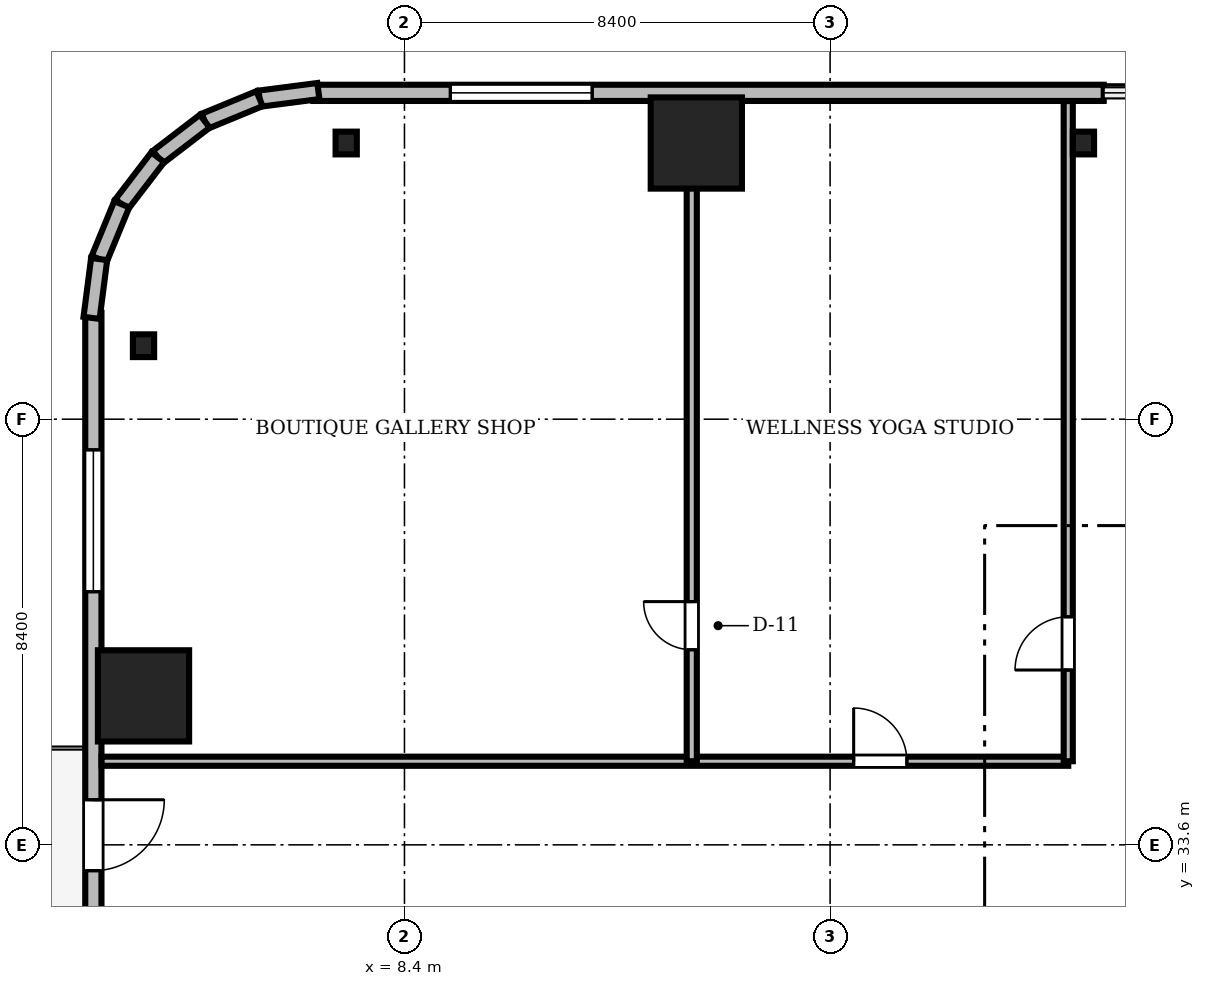
"""IFC4 building model, lengths in metres.
Left out: names, types, materials, properties, quantities, classifications, styles, units other than length and angle.
Written with IfcOpenShell. Run it as: python <this file> out.ifc"""

import sys

from ifc_helpers import new_model, si_unit, direction, frame, frame_2d, origin, origin_2d, place, context, subcontext, project, spatial, rectangle, i_section, extrude, source, transform, mapped, element, fill, save


model = new_model("IFC4")
c1 = context("Model", 3, precision=1e-05, world=origin(), true_north=direction((0.0, 1.0)))
c2 = subcontext(c1, "Body", "Model", "MODEL_VIEW")
j1 = project(units=[si_unit("LENGTHUNIT", "METRE"), si_unit("PLANEANGLEUNIT", "RADIAN")], contexts=[c1])
p1 = place(None, origin())
s1 = spatial("IfcSite", under=j1, at=p1, CompositionType="ELEMENT")
p2 = place(p1, origin())
s2 = spatial("IfcBuilding", under=s1, at=p2, CompositionType="ELEMENT")
p3 = place(p2, frame((0.0, 0.0, 49.5)))
s3 = spatial("IfcBuildingStorey", under=s2, at=p3, CompositionType="ELEMENT", Elevation=49.5)
m1 = source(origin(), c2, "Body", "SweptSolid", [
    extrude(rectangle(XDim=1.8, YDim=1.8, at=origin_2d()), origin(), (0.0, 0.0, 1.0), 3.41),
])
for number, where, z_axis, x_axis in (
    (1, (14.16, 47.45, 0.0), (0.0, 0.0, 1.0), (1.0, 0.0, 0.0)),
    (2, (3.25, 36.54, 0.0), (0.0, 0.0, 1.0), (1.0, 0.0, 0.0)),
):
    element("IfcColumn", number, at=place(p3, frame(where, z_axis=z_axis, x_axis=x_axis)), inside=s3, PredefinedType="COLUMN", context=c2, shape_type="MappedRepresentation", body=[
        mapped(m1, transform((0.0, 0.0, 0.0), scale=1.0)),
    ])
m2 = source(origin(), c2, "Body", "SweptSolid", [
    extrude(i_section(OverallWidth=0.419, OverallDepth=0.449, WebThickness=0.031, FlangeThickness=0.048, FilletRadius=0.015, at=origin_2d()), origin(), (0.0, 0.0, 1.0), 3.41),
])
for number, where, z_axis, x_axis in (
    (3, (21.8, 47.45, 0.0), (0.0, 0.0, 1.0), (1.0, 0.0, 0.0)),
    (4, (7.25, 47.45, 0.0), (0.0, 0.0, 1.0), (1.0, 0.0, 0.0)),
    (5, (3.25, 43.45, 0.0), (0.0, 0.0, 1.0), (1.0, 0.0, 0.0)),
):
    element("IfcColumn", number, at=place(p3, frame(where, z_axis=z_axis, x_axis=x_axis)), inside=s3, PredefinedType="COLUMN", context=c2, shape_type="MappedRepresentation", body=[
        mapped(m2, transform((0.0, 0.0, 0.0), scale=1.0)),
    ])
m3 = source(origin(), c2, "Body", "SweptSolid", [
    extrude(rectangle(XDim=15.6, YDim=0.32, at=frame_2d((7.8, 0.0))), origin(), (0.0, 0.0, 1.0), 3.41),
])
p4 = place(p3, frame((22.2, 48.44, 0.0), z_axis=(0.0, 0.0, 1.0), x_axis=(-1.0, 0.0, 0.0)))
e6 = element("IfcWall", 6, at=p4, inside=s3, PredefinedType="SOLIDWALL", context=c2, shape_type="MappedRepresentation", body=[
    mapped(m3, transform((0.0, 0.0, 0.0), scale=1.0)),
])
m4 = source(origin(), c2, "Body", "SweptSolid", [
    extrude(rectangle(XDim=2.8, YDim=2.4, at=frame_2d((1.4, 1.2))), frame((0.0, 0.17, 0.0), z_axis=(0.0, -1.0, 0.0), x_axis=(1.0, 0.0, 0.0)), (0.0, 0.0, 1.0), 0.34),
])
p5 = place(p4, frame((10.095, 0.0, 0.72)))
e7 = element("IfcOpeningElement", 7, at=p5, cuts=e6, PredefinedType="OPENING", context=c2, shape_type="MappedRepresentation", body=[
    mapped(m4, transform((0.0, 0.0, 0.0), scale=1.0)),
])
m5 = source(origin(), c2, "Body", "SweptSolid", [
    extrude(rectangle(XDim=15.6, YDim=0.32, at=frame_2d((7.8, 0.0))), origin(), (0.0, 0.0, 1.0), 3.41),
])
p6 = place(p3, frame((2.26, 44.1, 0.0), z_axis=(0.0, 0.0, 1.0), x_axis=(0.0, -1.0, 0.0)))
e8 = element("IfcWall", 8, at=p6, inside=s3, PredefinedType="SOLIDWALL", context=c2, shape_type="MappedRepresentation", body=[
    mapped(m5, transform((0.0, 0.0, 0.0), scale=1.0)),
])
m6 = source(origin(), c2, "Body", "SweptSolid", [
    extrude(rectangle(XDim=1.4, YDim=2.3, at=frame_2d((0.7, 1.15))), frame((0.0, 0.17, 0.0), z_axis=(0.0, -1.0, 0.0), x_axis=(1.0, 0.0, 0.0)), (0.0, 0.0, 1.0), 0.34),
])
p7 = place(p6, frame((9.61, 0.0, 0.0)))
e9 = element("IfcOpeningElement", 9, at=p7, cuts=e8, PredefinedType="OPENING", context=c2, shape_type="MappedRepresentation", body=[
    mapped(m6, transform((0.0, 0.0, 0.0), scale=1.0)),
])
p8 = place(p6, frame((2.705, 0.0, 0.72)))
e10 = element("IfcOpeningElement", 10, at=p8, cuts=e8, PredefinedType="OPENING", context=c2, shape_type="MappedRepresentation", body=[
    mapped(m4, transform((0.0, 0.0, 0.0), scale=1.0)),
])
m7 = source(origin(), c2, "Body", "SweptSolid", [
    extrude(rectangle(XDim=1.17, YDim=0.32, at=frame_2d((0.585, 0.0))), origin(), (0.0, 0.0, 1.0), 3.41),
])
p9 = place(p3, frame((6.7, 48.476, 0.0), z_axis=(0.0, 0.0, 1.0), x_axis=(-0.991735963317, -0.128295670475, 0.0)))
e11 = element("IfcWall", 11, at=p9, inside=s3, PredefinedType="SOLIDWALL", context=c2, shape_type="MappedRepresentation", body=[
    mapped(m7, transform((0.0, 0.0, 0.0), scale=1.0)),
])
m8 = source(origin(), c2, "Body", "SweptSolid", [
    extrude(rectangle(XDim=1.169, YDim=0.32, at=frame_2d((0.584, 0.0))), origin(), (0.0, 0.0, 1.0), 3.41),
])
p10 = place(p3, frame((5.54, 48.325, 0.0), z_axis=(0.0, 0.0, 1.0), x_axis=(-0.924552646638, -0.381054331552, 0.0)))
e12 = element("IfcWall", 12, at=p10, inside=s3, PredefinedType="SOLIDWALL", context=c2, shape_type="MappedRepresentation", body=[
    mapped(m8, transform((0.0, 0.0, 0.0), scale=1.0)),
])
m9 = source(origin(), c2, "Body", "SweptSolid", [
    extrude(rectangle(XDim=1.169, YDim=0.32, at=frame_2d((0.584, 0.0))), origin(), (0.0, 0.0, 1.0), 3.41),
])
p11 = place(p3, frame((4.459, 47.88, 0.0), z_axis=(0.0, 0.0, 1.0), x_axis=(-0.793663520347, -0.608356981114, 0.0)))
e13 = element("IfcWall", 13, at=p11, inside=s3, PredefinedType="SOLIDWALL", context=c2, shape_type="MappedRepresentation", body=[
    mapped(m9, transform((0.0, 0.0, 0.0), scale=1.0)),
])
m10 = source(origin(), c2, "Body", "SweptSolid", [
    extrude(rectangle(XDim=1.169, YDim=0.32, at=frame_2d((0.584, 0.0))), origin(), (0.0, 0.0, 1.0), 3.41),
])
p12 = place(p3, frame((3.531, 47.169, 0.0), z_axis=(0.0, 0.0, 1.0), x_axis=(-0.608387696831, -0.793639975269, 0.0)))
e14 = element("IfcWall", 14, at=p12, inside=s3, PredefinedType="SOLIDWALL", context=c2, shape_type="MappedRepresentation", body=[
    mapped(m10, transform((0.0, 0.0, 0.0), scale=1.0)),
])
p13 = place(p3, frame((2.82, 46.241, 0.0), z_axis=(0.0, 0.0, 1.0), x_axis=(-0.381054331552, -0.924552646638, 0.0)))
e15 = element("IfcWall", 15, at=p13, inside=s3, PredefinedType="SOLIDWALL", context=c2, shape_type="MappedRepresentation", body=[
    mapped(m8, transform((0.0, 0.0, 0.0), scale=1.0)),
])
p14 = place(p3, frame((2.375, 45.16, 0.0), z_axis=(0.0, 0.0, 1.0), x_axis=(-0.128295670475, -0.991735963317, 0.0)))
e16 = element("IfcWall", 16, at=p14, inside=s3, PredefinedType="SOLIDWALL", context=c2, shape_type="MappedRepresentation", body=[
    mapped(m7, transform((0.0, 0.0, 0.0), scale=1.0)),
])
m11 = source(origin(), c2, "Body", "SweptSolid", [
    extrude(rectangle(XDim=19.078, YDim=0.18, at=frame_2d((9.539, 0.0))), origin(), (0.0, 0.0, 1.0), 2.652),
])
p15 = place(p3, frame((2.422, 35.25, 0.0), z_axis=(0.0, 0.0, 1.0), x_axis=(1.0, 0.0, 0.0)))
e17 = element("IfcWall", 17, at=p15, inside=s3, PredefinedType="PARTITIONING", context=c2, shape_type="MappedRepresentation", body=[
    mapped(m11, transform((0.0, 0.0, 0.0), scale=1.0)),
])
m12 = source(origin(), c2, "Body", "SweptSolid", [
    extrude(rectangle(XDim=1.05, YDim=2.2, at=frame_2d((0.525, 1.1))), frame((0.0, 0.1, 0.0), z_axis=(0.0, -1.0, 0.0), x_axis=(1.0, 0.0, 0.0)), (0.0, 0.0, 1.0), 0.2),
])
p16 = place(p15, frame((14.843, 0.0, 0.0)))
e18 = element("IfcOpeningElement", 18, at=p16, cuts=e17, PredefinedType="OPENING", context=c2, shape_type="MappedRepresentation", body=[
    mapped(m12, transform((0.0, 0.0, 0.0), scale=1.0)),
])
m13 = source(origin(), c2, "Body", "SweptSolid", [
    extrude(rectangle(XDim=13.028, YDim=0.2, at=frame_2d((6.514, 0.0))), origin(), (0.0, 0.0, 1.0), 2.652),
])
p17 = place(p3, frame((14.07, 35.25, 0.0), z_axis=(0.0, 0.0, 1.0), x_axis=(0.0, 1.0, 0.0)))
e19 = element("IfcWall", 19, at=p17, inside=s3, PredefinedType="PARTITIONING", context=c2, shape_type="MappedRepresentation", body=[
    mapped(m13, transform((0.0, 0.0, 0.0), scale=1.0)),
])
m14 = source(origin(), c2, "Body", "SweptSolid", [
    extrude(rectangle(XDim=0.95, YDim=2.15, at=frame_2d((0.475, 1.075))), frame((0.0, 0.11, 0.0), z_axis=(0.0, -1.0, 0.0), x_axis=(1.0, 0.0, 0.0)), (0.0, 0.0, 1.0), 0.22),
])
p18 = place(p17, frame((2.2, 0.0, 0.0)))
e20 = element("IfcOpeningElement", 20, at=p18, cuts=e19, PredefinedType="OPENING", context=c2, shape_type="MappedRepresentation", body=[
    mapped(m14, transform((0.0, 0.0, 0.0), scale=1.0)),
])
m15 = source(origin(), c2, "Body", "SweptSolid", [
    extrude(rectangle(XDim=13.028, YDim=0.18, at=frame_2d((6.514, 0.0))), origin(), (0.0, 0.0, 1.0), 2.652),
])
p19 = place(p3, frame((21.5, 35.25, 0.0), z_axis=(0.0, 0.0, 1.0), x_axis=(0.0, 1.0, 0.0)))
e21 = element("IfcWall", 21, at=p19, inside=s3, PredefinedType="PARTITIONING", context=c2, shape_type="MappedRepresentation", body=[
    mapped(m15, transform((0.0, 0.0, 0.0), scale=1.0)),
])
p20 = place(p19, frame((1.8, 0.0, 0.0)))
e22 = element("IfcOpeningElement", 22, at=p20, cuts=e21, PredefinedType="OPENING", context=c2, shape_type="MappedRepresentation", body=[
    mapped(m12, transform((0.0, 0.0, 0.0), scale=1.0)),
])
m16 = source(origin(), c2, "Body", "SweptSolid", [
    extrude(rectangle(XDim=2.8, YDim=2.4, at=frame_2d((1.4, 1.2))), frame((0.0, 0.03, 0.0), z_axis=(0.0, -1.0, 0.0), x_axis=(1.0, 0.0, 0.0)), (0.0, 0.0, 1.0), 0.06),
])
p21 = place(p5, origin())
e23 = element("IfcWindow", 23, at=p21, inside=s3, PartitioningType="SINGLE_PANEL", PredefinedType="WINDOW", context=c2, shape_type="MappedRepresentation", body=[
    mapped(m16, transform((0.0, 0.0, 0.0), scale=1.0)),
])
fill(e7, e23)
m17 = source(origin(), c2, "Body", "SweptSolid", [
    extrude(rectangle(XDim=1.4, YDim=2.3, at=frame_2d((0.7, 1.15))), frame((0.0, 0.025, 0.0), z_axis=(0.0, -1.0, 0.0), x_axis=(1.0, 0.0, 0.0)), (0.0, 0.0, 1.0), 0.05),
])
p22 = place(p7, frame((1.4, 0.0, 0.0), z_axis=(0.0, 0.0, 1.0), x_axis=(-1.0, 0.0, 0.0)))
e24 = element("IfcDoor", 24, at=p22, inside=s3, OperationType="DOUBLE_DOOR_SLIDING", PredefinedType="DOOR", context=c2, shape_type="MappedRepresentation", body=[
    mapped(m17, transform((0.0, 0.0, 0.0), scale=1.0)),
])
fill(e9, e24)
p23 = place(p8, origin())
e25 = element("IfcWindow", 25, at=p23, inside=s3, PartitioningType="SINGLE_PANEL", PredefinedType="WINDOW", context=c2, shape_type="MappedRepresentation", body=[
    mapped(m16, transform((0.0, 0.0, 0.0), scale=1.0)),
])
fill(e10, e25)
m18 = source(origin(), c2, "Body", "SweptSolid", [
    extrude(rectangle(XDim=1.05, YDim=2.2, at=frame_2d((0.525, 1.1))), frame((0.0, 0.025, 0.0), z_axis=(0.0, -1.0, 0.0), x_axis=(1.0, 0.0, 0.0)), (0.0, 0.0, 1.0), 0.05),
])
p24 = place(p16, origin())
e26 = element("IfcDoor", 26, at=p24, inside=s3, OperationType="SINGLE_SWING_LEFT", PredefinedType="DOOR", context=c2, shape_type="MappedRepresentation", body=[
    mapped(m18, transform((0.0, 0.0, 0.0), scale=1.0)),
])
fill(e18, e26)
m19 = source(origin(), c2, "Body", "SweptSolid", [
    extrude(rectangle(XDim=0.95, YDim=2.15, at=frame_2d((0.475, 1.075))), frame((0.0, 0.025, 0.0), z_axis=(0.0, -1.0, 0.0), x_axis=(1.0, 0.0, 0.0)), (0.0, 0.0, 1.0), 0.05),
])
p25 = place(p18, origin())
e27 = element("IfcDoor", 27, at=p25, inside=s3, OperationType="SINGLE_SWING_RIGHT", PredefinedType="DOOR", context=c2, shape_type="MappedRepresentation", body=[
    mapped(m19, transform((0.0, 0.0, 0.0), scale=1.0)),
])
fill(e20, e27)
p26 = place(p20, origin())
e28 = element("IfcDoor", 28, at=p26, inside=s3, OperationType="SINGLE_SWING_LEFT", PredefinedType="DOOR", context=c2, shape_type="MappedRepresentation", body=[
    mapped(m18, transform((0.0, 0.0, 0.0), scale=1.0)),
])
fill(e22, e28)
save(model, sys.argv[1])
